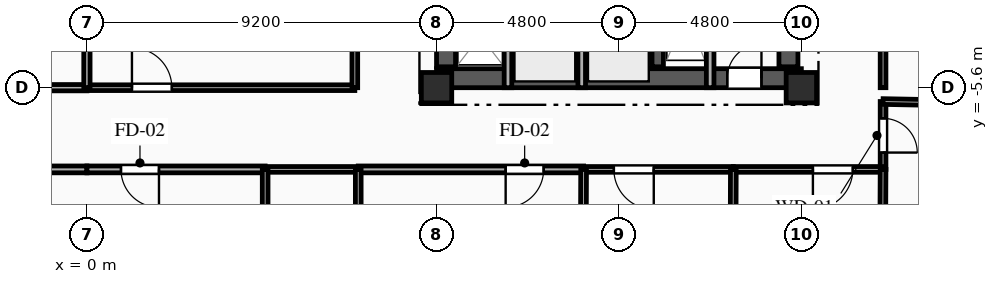
"""IFC4 building model, lengths in metres.
Left out: names, types, materials, properties, quantities, classifications, styles, units other than length and angle.
Written with IfcOpenShell. Run it as: python <this file> out.ifc"""

import sys

from ifc_helpers import new_model, si_unit, direction, frame, frame_2d, origin, origin_2d, place, context, subcontext, project, spatial, rectangle, extrude, element, fill, save


model = new_model("IFC4")
c1 = context("Model", 3, precision=1e-05, world=origin(), true_north=direction((0.0, 1.0)))
c2 = subcontext(c1, "Body", "Model", "MODEL_VIEW")
j1 = project(units=[si_unit("LENGTHUNIT", "METRE"), si_unit("PLANEANGLEUNIT", "RADIAN")], contexts=[c1])
p1 = place(None, origin())
s1 = spatial("IfcSite", under=j1, at=p1, CompositionType="ELEMENT")
p2 = place(p1, origin())
s2 = spatial("IfcBuilding", under=s1, at=p2, CompositionType="ELEMENT")
p3 = place(p2, frame((0.0, 0.0, 193.05)))
s3 = spatial("IfcBuildingStorey", under=s2, at=p3, CompositionType="ELEMENT", Elevation=193.05)
for number, where, z_axis, x_axis in (
    (1, (9.2, -5.6, 0.0), (0.0, 0.0, 1.0), (1.0, 0.0, 0.0)),
    (2, (18.8, -5.6, 0.0), (0.0, 0.0, 1.0), (1.0, 0.0, 0.0)),
):
    element("IfcColumn", number, at=place(p3, frame(where, z_axis=z_axis, x_axis=x_axis)), inside=s3, PredefinedType="COLUMN", context=c2, shape_type="SweptSolid", body=[
        extrude(rectangle(XDim=0.8, YDim=0.8, at=origin_2d()), origin(), (0.0, 0.0, 1.0), 3.35),
    ])
p4 = place(p3, frame((9.2, -5.35, 0.0), z_axis=(0.0, 0.0, 1.0), x_axis=(1.0, 0.0, 0.0)))
e3 = element("IfcWall", 3, at=p4, inside=s3, PredefinedType="SHEAR", context=c2, shape_type="SweptSolid", body=[
    extrude(rectangle(XDim=9.6, YDim=0.5, at=frame_2d((4.8, 0.0))), origin(), (0.0, 0.0, 1.0), 3.04),
])
p5 = place(p4, frame((7.65, 0.0, 0.0)))
e4 = element("IfcOpeningElement", 4, at=p5, cuts=e3, PredefinedType="OPENING", context=c2, shape_type="SweptSolid", body=[
    extrude(rectangle(XDim=0.9, YDim=2.1, at=frame_2d((0.45, 1.05))), frame((0.0, 0.26, 0.0), z_axis=(0.0, -1.0, 0.0), x_axis=(1.0, 0.0, 0.0)), (0.0, 0.0, 1.0), 0.52),
])
p6 = place(p3, frame((9.45, -5.05, 0.0), z_axis=(0.0, 0.0, 1.0), x_axis=(0.0, 1.0, 0.0)))
e5 = element("IfcWall", 5, at=p6, inside=s3, PredefinedType="SHEAR", context=c2, shape_type="SweptSolid", body=[
    extrude(rectangle(XDim=10.1, YDim=0.5, at=frame_2d((5.05, 0.0))), origin(), (0.0, 0.0, 1.0), 3.04),
])
p7 = place(p6, frame((7.15, 0.0, 0.0)))
e6 = element("IfcOpeningElement", 6, at=p7, cuts=e5, PredefinedType="OPENING", context=c2, shape_type="SweptSolid", body=[
    extrude(rectangle(XDim=0.9, YDim=2.1, at=frame_2d((0.45, 1.05))), frame((0.0, 0.26, 0.0), z_axis=(0.0, -1.0, 0.0), x_axis=(1.0, 0.0, 0.0)), (0.0, 0.0, 1.0), 0.52),
])
p8 = place(p6, frame((2.4, 0.0, 0.0)))
e7 = element("IfcOpeningElement", 7, at=p8, cuts=e5, PredefinedType="OPENING", context=c2, shape_type="SweptSolid", body=[
    extrude(rectangle(XDim=1.2, YDim=2.15, at=frame_2d((0.6, 1.075))), frame((0.0, 0.26, 0.0), z_axis=(0.0, -1.0, 0.0), x_axis=(1.0, 0.0, 0.0)), (0.0, 0.0, 1.0), 0.52),
])
p9 = place(p3, frame((18.46, -5.05, 0.0), z_axis=(0.0, 0.0, 1.0), x_axis=(0.0, 1.0, 0.0)))
e8 = element("IfcWall", 8, at=p9, inside=s3, PredefinedType="SHEAR", context=c2, shape_type="SweptSolid", body=[
    extrude(rectangle(XDim=10.1, YDim=0.5, at=frame_2d((5.05, 0.0))), origin(), (0.0, 0.0, 1.0), 3.04),
])
p10 = place(p3, frame((15.02, -5.05, 0.0), z_axis=(0.0, 0.0, 1.0), x_axis=(0.0, 1.0, 0.0)))
e9 = element("IfcWall", 9, at=p10, inside=s3, PredefinedType="SHEAR", context=c2, shape_type="SweptSolid", body=[
    extrude(rectangle(XDim=10.1, YDim=0.3, at=frame_2d((5.05, 0.0))), origin(), (0.0, 0.0, 1.0), 3.04),
])
p11 = place(p3, frame((16.4, -2.11, 0.0), z_axis=(0.0, 0.0, 1.0), x_axis=(0.0, -1.0, 0.0)))
e10 = element("IfcWall", 10, at=p11, inside=s3, PredefinedType="PARTITIONING", context=c2, shape_type="SweptSolid", body=[
    extrude(rectangle(XDim=3.49, YDim=0.2, at=frame_2d((1.745, 0.0))), origin(), (0.0, 0.0, 1.0), 3.04),
])
for number, where, z_axis, x_axis in (
    (11, (11.08, -5.6, 0.0), (0.0, 0.0, 1.0), (0.0, 1.0, 0.0)),
    (12, (13.02, -5.6, 0.0), (0.0, 0.0, 1.0), (0.0, 1.0, 0.0)),
):
    element("IfcWall", number, at=place(p3, frame(where, z_axis=z_axis, x_axis=x_axis)), inside=s3, PredefinedType="PARTITIONING", context=c2, shape_type="SweptSolid", body=[
        extrude(rectangle(XDim=2.25, YDim=0.2, at=frame_2d((1.125, 0.0))), origin(), (0.0, 0.0, 1.0), 3.04),
    ])
p12 = place(p3, frame((0.0, -7.75, 0.0), z_axis=(0.0, 0.0, 1.0), x_axis=(-1.0, 0.0, 0.0)))
e13 = element("IfcWall", 13, at=p12, inside=s3, PredefinedType="PARTITIONING", context=c2, shape_type="SweptSolid", body=[
    extrude(rectangle(XDim=1.24, YDim=0.18, at=frame_2d((0.62, 0.0))), origin(), (0.0, 0.0, 1.0), 3.04),
])
p13 = place(p3, frame((-7.05, -5.6, 0.0), z_axis=(0.0, 0.0, 1.0), x_axis=(1.0, 0.0, 0.0)))
e14 = element("IfcWall", 14, at=p13, inside=s3, PredefinedType="PARTITIONING", context=c2, shape_type="SweptSolid", body=[
    extrude(rectangle(XDim=7.05, YDim=0.165, at=frame_2d((3.525, 0.0))), origin(), (0.0, 0.0, 1.0), 2.525),
])
p14 = place(p13, frame((4.728, 0.0, 0.0)))
e15 = element("IfcOpeningElement", 15, at=p14, cuts=e14, PredefinedType="OPENING", context=c2, shape_type="SweptSolid", body=[
    extrude(rectangle(XDim=1.15, YDim=2.15, at=frame_2d((0.575, 1.075))), frame((0.0, 0.093, 0.0), z_axis=(0.0, -1.0, 0.0), x_axis=(1.0, 0.0, 0.0)), (0.0, 0.0, 1.0), 0.185),
])
p15 = place(p3, frame((20.95, -5.964, 0.0), z_axis=(0.0, 0.0, 1.0), x_axis=(0.0, -1.0, 0.0)))
e16 = element("IfcWall", 16, at=p15, inside=s3, PredefinedType="PARTITIONING", context=c2, shape_type="SweptSolid", body=[
    extrude(rectangle(XDim=1.786, YDim=0.15, at=frame_2d((0.893, 0.0))), origin(), (0.0, 0.0, 1.0), 3.04),
])
p16 = place(p15, frame((0.443, 0.0, 0.0)))
e17 = element("IfcOpeningElement", 17, at=p16, cuts=e16, PredefinedType="OPENING", context=c2, shape_type="SweptSolid", body=[
    extrude(rectangle(XDim=0.9, YDim=2.1, at=frame_2d((0.45, 1.05))), frame((0.0, 0.085, 0.0), z_axis=(0.0, -1.0, 0.0), x_axis=(1.0, 0.0, 0.0)), (0.0, 0.0, 1.0), 0.17),
])
p17 = place(p3, frame((4.69, -7.75, 0.0), z_axis=(0.0, 0.0, 1.0), x_axis=(-1.0, 0.0, 0.0)))
e18 = element("IfcWall", 18, at=p17, inside=s3, PredefinedType="PARTITIONING", context=c2, shape_type="SweptSolid", body=[
    extrude(rectangle(XDim=4.69, YDim=0.18, at=frame_2d((2.345, 0.0))), origin(), (0.0, 0.0, 1.0), 3.04),
])
p18 = place(p17, frame((2.794, 0.0, 0.0)))
e19 = element("IfcOpeningElement", 19, at=p18, cuts=e18, PredefinedType="OPENING", context=c2, shape_type="SweptSolid", body=[
    extrude(rectangle(XDim=1.0, YDim=2.15, at=frame_2d((0.5, 1.075))), frame((0.0, 0.1, 0.0), z_axis=(0.0, -1.0, 0.0), x_axis=(1.0, 0.0, 0.0)), (0.0, 0.0, 1.0), 0.2),
])
p19 = place(p3, frame((13.07, -7.75, 0.0), z_axis=(0.0, 0.0, 1.0), x_axis=(-1.0, 0.0, 0.0)))
e20 = element("IfcWall", 20, at=p19, inside=s3, PredefinedType="PARTITIONING", context=c2, shape_type="SweptSolid", body=[
    extrude(rectangle(XDim=5.93, YDim=0.18, at=frame_2d((2.965, 0.0))), origin(), (0.0, 0.0, 1.0), 3.04),
])
p20 = place(p19, frame((1.051, 0.0, 0.0)))
e21 = element("IfcOpeningElement", 21, at=p20, cuts=e20, PredefinedType="OPENING", context=c2, shape_type="SweptSolid", body=[
    extrude(rectangle(XDim=1.0, YDim=2.15, at=frame_2d((0.5, 1.075))), frame((0.0, 0.1, 0.0), z_axis=(0.0, -1.0, 0.0), x_axis=(1.0, 0.0, 0.0)), (0.0, 0.0, 1.0), 0.2),
])
p21 = place(p3, frame((7.14, -7.75, 0.0), z_axis=(0.0, 0.0, 1.0), x_axis=(-1.0, 0.0, 0.0)))
e22 = element("IfcWall", 22, at=p21, inside=s3, PredefinedType="PLUMBINGWALL", context=c2, shape_type="SweptSolid", body=[
    extrude(rectangle(XDim=2.45, YDim=0.15, at=frame_2d((1.225, 0.0))), origin(), (0.0, 0.0, 1.0), 3.04),
])
p22 = place(p3, frame((17.01, -7.75, 0.0), z_axis=(0.0, 0.0, 1.0), x_axis=(-1.0, 0.0, 0.0)))
e23 = element("IfcWall", 23, at=p22, inside=s3, PredefinedType="PARTITIONING", context=c2, shape_type="SweptSolid", body=[
    extrude(rectangle(XDim=3.94, YDim=0.15, at=frame_2d((1.97, 0.0))), origin(), (0.0, 0.0, 1.0), 3.04),
])
p23 = place(p22, frame((2.094, 0.0, 0.0)))
e24 = element("IfcOpeningElement", 24, at=p23, cuts=e23, PredefinedType="OPENING", context=c2, shape_type="SweptSolid", body=[
    extrude(rectangle(XDim=1.05, YDim=2.15, at=frame_2d((0.525, 1.075))), frame((0.0, 0.085, 0.0), z_axis=(0.0, -1.0, 0.0), x_axis=(1.0, 0.0, 0.0)), (0.0, 0.0, 1.0), 0.17),
])
p24 = place(p3, frame((20.95, -7.75, 0.0), z_axis=(0.0, 0.0, 1.0), x_axis=(-1.0, 0.0, 0.0)))
e25 = element("IfcWall", 25, at=p24, inside=s3, PredefinedType="PARTITIONING", context=c2, shape_type="SweptSolid", body=[
    extrude(rectangle(XDim=3.94, YDim=0.15, at=frame_2d((1.97, 0.0))), origin(), (0.0, 0.0, 1.0), 3.04),
])
p25 = place(p24, frame((0.796, 0.0, 0.0)))
e26 = element("IfcOpeningElement", 26, at=p25, cuts=e25, PredefinedType="OPENING", context=c2, shape_type="SweptSolid", body=[
    extrude(rectangle(XDim=1.05, YDim=2.15, at=frame_2d((0.525, 1.075))), frame((0.0, 0.085, 0.0), z_axis=(0.0, -1.0, 0.0), x_axis=(1.0, 0.0, 0.0)), (0.0, 0.0, 1.0), 0.17),
])
p26 = place(p3, frame((0.0, -5.6, 0.0), z_axis=(0.0, 0.0, 1.0), x_axis=(1.0, 0.0, 0.0)))
e27 = element("IfcWall", 27, at=p26, inside=s3, PredefinedType="PARTITIONING", context=c2, shape_type="SweptSolid", body=[
    extrude(rectangle(XDim=7.05, YDim=0.15, at=frame_2d((3.525, 0.0))), origin(), (0.0, 0.0, 1.0), 2.525),
])
p27 = place(p26, frame((1.185, 0.0, 0.0)))
e28 = element("IfcOpeningElement", 28, at=p27, cuts=e27, PredefinedType="OPENING", context=c2, shape_type="SweptSolid", body=[
    extrude(rectangle(XDim=1.05, YDim=2.15, at=frame_2d((0.525, 1.075))), frame((0.0, 0.085, 0.0), z_axis=(0.0, -1.0, 0.0), x_axis=(1.0, 0.0, 0.0)), (0.0, 0.0, 1.0), 0.17),
])
p28 = place(p3, frame((20.95, 4.438, 0.0), z_axis=(0.0, 0.0, 1.0), x_axis=(0.0, -1.0, 0.0)))
e29 = element("IfcWall", 29, at=p28, inside=s3, PredefinedType="PARTITIONING", context=c2, shape_type="SweptSolid", body=[
    extrude(rectangle(XDim=10.038, YDim=0.15, at=frame_2d((5.019, 0.0))), origin(), (0.0, 0.0, 1.0), 2.695),
])
p29 = place(p28, frame((5.472, 0.0, 0.0)))
e30 = element("IfcOpeningElement", 30, at=p29, cuts=e29, PredefinedType="OPENING", context=c2, shape_type="SweptSolid", body=[
    extrude(rectangle(XDim=1.05, YDim=2.15, at=frame_2d((0.525, 1.075))), frame((0.0, 0.085, 0.0), z_axis=(0.0, -1.0, 0.0), x_axis=(1.0, 0.0, 0.0)), (0.0, 0.0, 1.0), 0.17),
])
p30 = place(p3, frame((7.05, -5.6, 0.0), z_axis=(0.0, 0.0, 1.0), x_axis=(0.0, 1.0, 0.0)))
e31 = element("IfcWall", 31, at=p30, inside=s3, PredefinedType="PARTITIONING", context=c2, shape_type="SweptSolid", body=[
    extrude(rectangle(XDim=2.65, YDim=0.15, at=frame_2d((1.325, 0.0))), origin(), (0.0, 0.0, 1.0), 3.04),
])
p31 = place(p3, frame((20.95, -5.964, 0.0), z_axis=(0.0, 0.0, 1.0), x_axis=(0.999809784752, -0.019503700029, 0.0)))
e32 = element("IfcWall", 32, at=p31, inside=s3, PredefinedType="PARTITIONING", context=c2, shape_type="SweptSolid", body=[
    extrude(rectangle(XDim=2.241, YDim=0.15, at=frame_2d((1.12, 0.0))), origin(), (0.0, 0.0, 1.0), 3.04),
])
p32 = place(p3, frame((20.906, -16.708, 0.0), z_axis=(0.0, 0.0, 1.0), x_axis=(0.004905642486, 0.999987967264, 0.0)))
e33 = element("IfcWall", 33, at=p32, inside=s3, PredefinedType="PARTITIONING", context=c2, shape_type="SweptSolid", body=[
    extrude(rectangle(XDim=8.958, YDim=0.15, at=frame_2d((4.479, 0.0))), origin(), (0.0, 0.0, 1.0), 2.665),
])
for number, where, z_axis, x_axis in (
    (34, (4.69, -7.75, 0.0), (0.0, 0.0, 1.0), (0.0, -1.0, 0.0)),
    (35, (7.14, -9.9, 0.0), (0.0, 0.0, 1.0), (0.0, 1.0, 0.0)),
):
    element("IfcWall", number, at=place(p3, frame(where, z_axis=z_axis, x_axis=x_axis)), inside=s3, PredefinedType="PLUMBINGWALL", context=c2, shape_type="SweptSolid", body=[
        extrude(rectangle(XDim=2.15, YDim=0.15, at=frame_2d((1.075, 0.0))), origin(), (0.0, 0.0, 1.0), 3.04),
    ])
p33 = place(p3, frame((13.07, -7.75, 0.0), z_axis=(0.0, 0.0, 1.0), x_axis=(-0.003942582434, -0.999992227992, 0.0)))
e36 = element("IfcWall", 36, at=p33, inside=s3, PredefinedType="PARTITIONING", context=c2, shape_type="SweptSolid", body=[
    extrude(rectangle(XDim=11.146, YDim=0.15, at=frame_2d((5.573, 0.0))), origin(), (0.0, 0.0, 1.0), 3.04),
])
p34 = place(p3, frame((17.01, -7.75, 0.0), z_axis=(0.0, 0.0, 1.0), x_axis=(-0.003801370604, -0.999992774765, 0.0)))
e37 = element("IfcWall", 37, at=p34, inside=s3, PredefinedType="PARTITIONING", context=c2, shape_type="SweptSolid", body=[
    extrude(rectangle(XDim=11.56, YDim=0.15, at=frame_2d((5.78, 0.0))), origin(), (0.0, 0.0, 1.0), 3.04),
])
p35 = place(p3, frame((0.0, -2.95, 0.0), z_axis=(0.0, 0.0, 1.0), x_axis=(0.0, -1.0, 0.0)))
e38 = element("IfcWall", 38, at=p35, inside=s3, PredefinedType="PARTITIONING", context=c2, shape_type="SweptSolid", body=[
    extrude(rectangle(XDim=2.65, YDim=0.165, at=frame_2d((1.325, 0.0))), origin(), (0.0, 0.0, 1.0), 3.04),
])
p36 = place(p5, origin())
e39 = element("IfcDoor", 39, at=p36, inside=s3, OperationType="SINGLE_SWING_RIGHT", PredefinedType="DOOR", context=c2, shape_type="SweptSolid", body=[
    extrude(rectangle(XDim=0.9, YDim=2.1, at=frame_2d((0.45, 1.05))), frame((0.0, 0.025, 0.0), z_axis=(0.0, -1.0, 0.0), x_axis=(1.0, 0.0, 0.0)), (0.0, 0.0, 1.0), 0.05),
])
fill(e4, e39)
p37 = place(p16, origin())
e40 = element("IfcDoor", 40, at=p37, inside=s3, OperationType="SINGLE_SWING_RIGHT", PredefinedType="DOOR", context=c2, shape_type="SweptSolid", body=[
    extrude(rectangle(XDim=0.9, YDim=2.1, at=frame_2d((0.45, 1.05))), frame((0.0, 0.025, 0.0), z_axis=(0.0, -1.0, 0.0), x_axis=(1.0, 0.0, 0.0)), (0.0, 0.0, 1.0), 0.05),
])
fill(e17, e40)
p38 = place(p18, origin())
e41 = element("IfcDoor", 41, at=p38, inside=s3, OperationType="SINGLE_SWING_LEFT", PredefinedType="DOOR", context=c2, shape_type="SweptSolid", body=[
    extrude(rectangle(XDim=1.0, YDim=2.15, at=frame_2d((0.5, 1.075))), frame((0.0, 0.025, 0.0), z_axis=(0.0, -1.0, 0.0), x_axis=(1.0, 0.0, 0.0)), (0.0, 0.0, 1.0), 0.05),
])
fill(e19, e41)
p39 = place(p20, origin())
e42 = element("IfcDoor", 42, at=p39, inside=s3, OperationType="SINGLE_SWING_RIGHT", PredefinedType="DOOR", context=c2, shape_type="SweptSolid", body=[
    extrude(rectangle(XDim=1.0, YDim=2.15, at=frame_2d((0.5, 1.075))), frame((0.0, 0.025, 0.0), z_axis=(0.0, -1.0, 0.0), x_axis=(1.0, 0.0, 0.0)), (0.0, 0.0, 1.0), 0.05),
])
fill(e21, e42)
p40 = place(p23, origin())
e43 = element("IfcDoor", 43, at=p40, inside=s3, OperationType="SINGLE_SWING_LEFT", PredefinedType="DOOR", context=c2, shape_type="SweptSolid", body=[
    extrude(rectangle(XDim=1.05, YDim=2.15, at=frame_2d((0.525, 1.075))), frame((0.0, 0.025, 0.0), z_axis=(0.0, -1.0, 0.0), x_axis=(1.0, 0.0, 0.0)), (0.0, 0.0, 1.0), 0.05),
])
fill(e24, e43)
p41 = place(p25, origin())
e44 = element("IfcDoor", 44, at=p41, inside=s3, OperationType="SINGLE_SWING_RIGHT", PredefinedType="DOOR", context=c2, shape_type="SweptSolid", body=[
    extrude(rectangle(XDim=1.05, YDim=2.15, at=frame_2d((0.525, 1.075))), frame((0.0, 0.025, 0.0), z_axis=(0.0, -1.0, 0.0), x_axis=(1.0, 0.0, 0.0)), (0.0, 0.0, 1.0), 0.05),
])
fill(e26, e44)
p42 = place(p27, origin())
e45 = element("IfcDoor", 45, at=p42, inside=s3, OperationType="SINGLE_SWING_LEFT", PredefinedType="DOOR", context=c2, shape_type="SweptSolid", body=[
    extrude(rectangle(XDim=1.05, YDim=2.15, at=frame_2d((0.525, 1.075))), frame((0.0, 0.025, 0.0), z_axis=(0.0, -1.0, 0.0), x_axis=(1.0, 0.0, 0.0)), (0.0, 0.0, 1.0), 0.05),
])
fill(e28, e45)
save(model, sys.argv[1])
